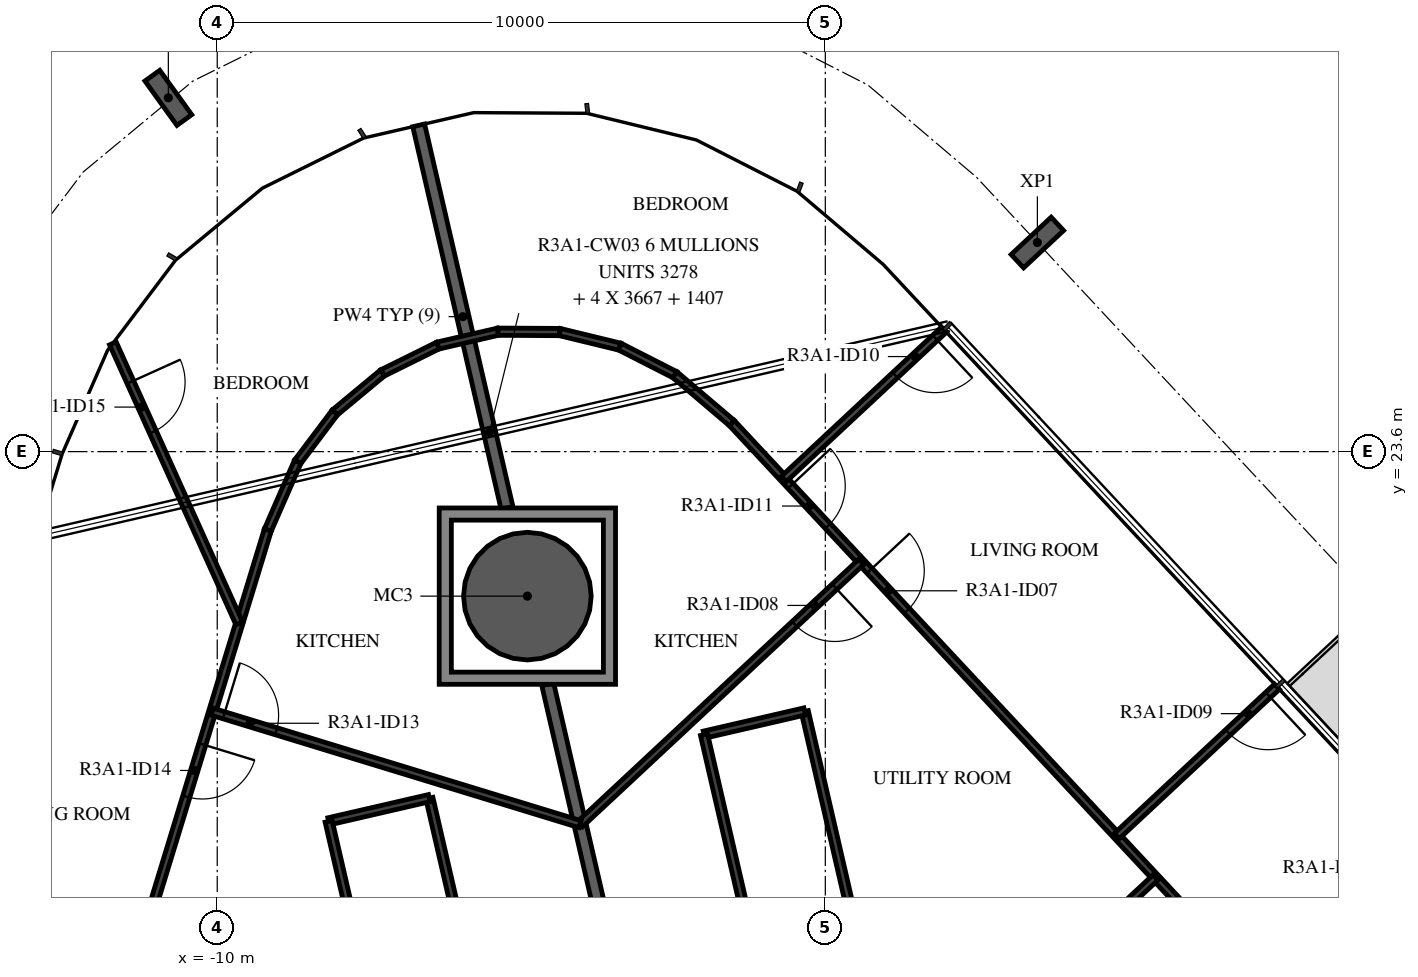
"""IFC4 building model, lengths in metres.
Left out: names, types, materials, properties, quantities, classifications, styles, units other than length and angle.
Written with IfcOpenShell. Run it as: python <this file> out.ifc"""

import sys

from ifc_helpers import new_model, si_unit, direction, frame, frame_2d, origin, origin_2d, place, context, subcontext, project, spatial, polyline, rectangle, hollow_circle, i_section, outline, extrude, element, fill, save


model = new_model("IFC4")
c1 = context("Model", 3, precision=1e-05, world=origin(), true_north=direction((0.0, 1.0)))
c2 = subcontext(c1, "Body", "Model", "MODEL_VIEW")
j1 = project(units=[si_unit("LENGTHUNIT", "METRE"), si_unit("PLANEANGLEUNIT", "RADIAN")], contexts=[c1])
p1 = place(None, origin())
s1 = spatial("IfcSite", under=j1, at=p1, CompositionType="ELEMENT")
p2 = place(p1, origin())
s2 = spatial("IfcBuilding", under=s1, at=p2, CompositionType="ELEMENT")
p3 = place(p2, frame((0.0, 0.0, 116.9)))
s3 = spatial("IfcBuildingStorey", under=s2, at=p3, CompositionType="ELEMENT", Elevation=116.9)
p4 = place(p3, frame((-4.9, 21.223, -0.38), z_axis=(0.0, 0.0, 1.0), x_axis=(1.0, 0.0, 0.0)))
e1 = element("IfcColumn", 1, at=p4, inside=s3, PredefinedType="COLUMN", context=c2, shape_type="SweptSolid", body=[
    extrude(hollow_circle(Radius=1.05, WallThickness=0.05, at=origin_2d()), origin(), (0.0, 0.0, 1.0), 3.5),
])
for number, where, z_axis, x_axis in (
    (2, (3.487, 27.039, -0.38), (0.0, 0.0, 1.0), (0.682, -0.731, 0.0)),
    (3, (-10.804, 29.418, -0.38), (0.0, 0.0, 1.0), (0.811, 0.585, 0.0)),
):
    element("IfcColumn", number, at=place(p3, frame(where, z_axis=z_axis, x_axis=x_axis)), inside=s3, PredefinedType="COLUMN", context=c2, shape_type="SweptSolid", body=[
        extrude(i_section(OverallWidth=0.3, OverallDepth=0.9, WebThickness=0.019, FlangeThickness=0.035, FilletRadius=0.03, at=origin_2d()), origin(), (0.0, 0.0, 1.0), 3.5),
    ])
p5 = place(p3, frame((-4.565, 19.773, 0.0), z_axis=(0.0, 0.0, 1.0), x_axis=(0.224940633072, -0.974372470667, 0.0)))
e4 = element("IfcWall", 4, at=p5, inside=s3, PredefinedType="STANDARD", context=c2, shape_type="SweptSolid", body=[
    extrude(rectangle(XDim=6.594, YDim=0.2, at=frame_2d((3.297, 0.0))), origin(), (0.0, 0.0, 1.0), 3.12),
])
p6 = place(p3, frame((-6.687, 28.966, 0.0), z_axis=(0.0, 0.0, 1.0), x_axis=(0.224945100086, -0.974371439415, 0.0)))
e5 = element("IfcWall", 5, at=p6, inside=s3, PredefinedType="STANDARD", context=c2, shape_type="SweptSolid", body=[
    extrude(rectangle(XDim=6.458, YDim=0.2, at=frame_2d((3.229, 0.0))), origin(), (0.0, 0.0, 1.0), 3.12),
])
p7 = place(p3, frame((0.496, 15.714, 0.0), z_axis=(0.0, 0.0, 1.0), x_axis=(-0.224960478174, 0.974367889075, 0.0)))
e6 = element("IfcWall", 6, at=p7, inside=s3, PredefinedType="PARTITIONING", context=c2, shape_type="SweptSolid", body=[
    extrude(rectangle(XDim=3.708, YDim=0.12, at=frame_2d((1.854, 0.0))), origin(), (0.0, 0.0, 1.0), 3.12),
])
p8 = place(p3, frame((-0.338, 19.328, 0.0), z_axis=(0.0, 0.0, 1.0), x_axis=(-0.974383934081, -0.224890971374, 0.0)))
e7 = element("IfcWall", 7, at=p8, inside=s3, PredefinedType="PARTITIONING", context=c2, shape_type="SweptSolid", body=[
    extrude(rectangle(XDim=1.7, YDim=0.12, at=frame_2d((0.85, 0.0))), origin(), (0.0, 0.0, 1.0), 3.12),
])
p9 = place(p3, frame((-1.995, 18.945, 0.0), z_axis=(0.0, 0.0, 1.0), x_axis=(0.224946048274, -0.974371220514, 0.0)))
e8 = element("IfcWall", 8, at=p9, inside=s3, PredefinedType="PARTITIONING", context=c2, shape_type="SweptSolid", body=[
    extrude(rectangle(XDim=3.708, YDim=0.12, at=frame_2d((1.854, 0.0))), origin(), (0.0, 0.0, 1.0), 3.12),
])
p10 = place(p3, frame((-1.539, 24.071, 0.0), z_axis=(0.0, 0.0, 1.0), x_axis=(0.68200220595, -0.731350115252, 0.0)))
e9 = element("IfcWall", 9, at=p10, inside=s3, PredefinedType="PARTITIONING", context=c2, shape_type="SweptSolid", body=[
    extrude(rectangle(XDim=17.316, YDim=0.12, at=frame_2d((8.658, 0.0))), origin(), (0.0, 0.0, 1.0), 3.12),
])
p11 = place(p10, frame((3.323, 0.0, 0.0)))
e10 = element("IfcOpeningElement", 10, at=p11, cuts=e9, PredefinedType="OPENING", context=c2, shape_type="SweptSolid", body=[
    extrude(rectangle(XDim=0.9, YDim=2.1, at=frame_2d((0.45, 1.05))), frame((0.0, 0.07, 0.0), z_axis=(0.0, -1.0, 0.0), x_axis=(1.0, 0.0, 0.0)), (0.0, 0.0, 1.0), 0.14),
])
p12 = place(p10, frame((1.417, 0.0, 0.0)))
e11 = element("IfcOpeningElement", 11, at=p12, cuts=e9, PredefinedType="OPENING", context=c2, shape_type="SweptSolid", body=[
    extrude(rectangle(XDim=0.9, YDim=2.1, at=frame_2d((0.45, 1.05))), frame((0.0, 0.07, 0.0), z_axis=(0.0, -1.0, 0.0), x_axis=(1.0, 0.0, 0.0)), (0.0, 0.0, 1.0), 0.14),
])
p13 = place(p3, frame((7.427, 19.734, 0.0), z_axis=(0.0, 0.0, 1.0), x_axis=(-0.73139345201, -0.681955730497, 0.0)))
e12 = element("IfcWall", 12, at=p13, inside=s3, PredefinedType="PARTITIONING", context=c2, shape_type="SweptSolid", body=[
    extrude(rectangle(XDim=3.6, YDim=0.12, at=frame_2d((1.8, 0.0))), origin(), (0.0, 0.0, 1.0), 2.73),
])
p14 = place(p13, frame((0.2, 0.0, 0.0)))
e13 = element("IfcOpeningElement", 13, at=p14, cuts=e12, PredefinedType="OPENING", context=c2, shape_type="SweptSolid", body=[
    extrude(rectangle(XDim=0.9, YDim=2.1, at=frame_2d((0.45, 1.05))), frame((0.0, 0.07, 0.0), z_axis=(0.0, -1.0, 0.0), x_axis=(1.0, 0.0, 0.0)), (0.0, 0.0, 1.0), 0.14),
])
p15 = place(p3, frame((5.431, 16.597, 0.0), z_axis=(0.0, 0.0, 1.0), x_axis=(-0.731378807316, -0.681971436505, 0.0)))
e14 = element("IfcWall", 14, at=p15, inside=s3, PredefinedType="PARTITIONING", context=c2, shape_type="SweptSolid", body=[
    extrude(rectangle(XDim=2.609, YDim=0.12, at=frame_2d((1.305, 0.0))), origin(), (0.0, 0.0, 1.0), 3.12),
])
p16 = place(p3, frame((1.951, 25.607, 0.0), z_axis=(0.0, 0.0, 1.0), x_axis=(-0.731328084739, -0.682025829769, 0.0)))
e15 = element("IfcWall", 15, at=p16, inside=s3, PredefinedType="PARTITIONING", context=c2, shape_type="SweptSolid", body=[
    extrude(rectangle(XDim=3.6, YDim=0.12, at=frame_2d((1.8, 0.0))), origin(), (0.0, 0.0, 1.0), 2.73),
])
p17 = place(p16, frame((0.2, 0.0, 0.0)))
e16 = element("IfcOpeningElement", 16, at=p17, cuts=e15, PredefinedType="OPENING", context=c2, shape_type="SweptSolid", body=[
    extrude(rectangle(XDim=0.9, YDim=2.1, at=frame_2d((0.45, 1.05))), frame((0.0, 0.07, 0.0), z_axis=(0.0, -1.0, 0.0), x_axis=(1.0, 0.0, 0.0)), (0.0, 0.0, 1.0), 0.14),
])
p18 = place(p3, frame((0.591, 21.787, 0.0), z_axis=(0.0, 0.0, 1.0), x_axis=(-0.731363296574, -0.681988070588, 0.0)))
e17 = element("IfcWall", 17, at=p18, inside=s3, PredefinedType="PARTITIONING", context=c2, shape_type="SweptSolid", body=[
    extrude(rectangle(XDim=6.324, YDim=0.12, at=frame_2d((3.162, 0.0))), origin(), (0.0, 0.0, 1.0), 3.12),
])
p19 = place(p18, frame((0.6, 0.0, 0.0)))
e18 = element("IfcOpeningElement", 18, at=p19, cuts=e17, PredefinedType="OPENING", context=c2, shape_type="SweptSolid", body=[
    extrude(rectangle(XDim=0.9, YDim=2.1, at=frame_2d((0.45, 1.05))), frame((0.0, 0.07, 0.0), z_axis=(0.0, -1.0, 0.0), x_axis=(1.0, 0.0, 0.0)), (0.0, 0.0, 1.0), 0.14),
])
for number, where, z_axis, x_axis in (
    (19, (-6.372, 25.344, 0.0), (0.0, 0.0, 1.0), (0.974, 0.225, 0.0)),
    (20, (-5.383, 25.572, 0.0), (0.0, 0.0, 1.0), (1.0, -0.006, 0.0)),
):
    element("IfcWall", number, at=place(p3, frame(where, z_axis=z_axis, x_axis=x_axis)), inside=s3, PredefinedType="PARTITIONING", context=c2, shape_type="SweptSolid", body=[
        extrude(rectangle(XDim=1.016, YDim=0.12, at=frame_2d((0.508, 0.0))), origin(), (0.0, 0.0, 1.0), 3.12),
    ])
p20 = place(p3, frame((-4.367, 25.566, 0.0), z_axis=(0.0, 0.0, 1.0), x_axis=(0.971704876381, -0.236198292157, 0.0)))
e21 = element("IfcWall", 21, at=p20, inside=s3, PredefinedType="PARTITIONING", context=c2, shape_type="SweptSolid", body=[
    extrude(rectangle(XDim=1.016, YDim=0.12, at=frame_2d((0.508, 0.0))), origin(), (0.0, 0.0, 1.0), 3.12),
])
p21 = place(p3, frame((-3.379, 25.326, 0.0), z_axis=(0.0, 0.0, 1.0), x_axis=(0.890890892221, -0.454217368842, 0.0)))
e22 = element("IfcWall", 22, at=p21, inside=s3, PredefinedType="PARTITIONING", context=c2, shape_type="SweptSolid", body=[
    extrude(rectangle(XDim=1.016, YDim=0.12, at=frame_2d((0.508, 0.0))), origin(), (0.0, 0.0, 1.0), 3.12),
])
p22 = place(p3, frame((-2.474, 24.865, 0.0), z_axis=(0.0, 0.0, 1.0), x_axis=(0.762351487461, -0.647163201647, 0.0)))
e23 = element("IfcWall", 23, at=p22, inside=s3, PredefinedType="PARTITIONING", context=c2, shape_type="SweptSolid", body=[
    extrude(rectangle(XDim=1.227, YDim=0.12, at=frame_2d((0.614, 0.0))), origin(), (0.0, 0.0, 1.0), 3.12),
])
p23 = place(p3, frame((-5.677, 14.289, 0.0), z_axis=(0.0, 0.0, 1.0), x_axis=(-0.224960478174, 0.974367889075, 0.0)))
e24 = element("IfcWall", 24, at=p23, inside=s3, PredefinedType="PARTITIONING", context=c2, shape_type="SweptSolid", body=[
    extrude(rectangle(XDim=3.708, YDim=0.12, at=frame_2d((1.854, 0.0))), origin(), (0.0, 0.0, 1.0), 3.12),
])
p24 = place(p3, frame((-6.512, 17.902, 0.0), z_axis=(0.0, 0.0, 1.0), x_axis=(-0.974376669418, -0.224922444621, 0.0)))
e25 = element("IfcWall", 25, at=p24, inside=s3, PredefinedType="PARTITIONING", context=c2, shape_type="SweptSolid", body=[
    extrude(rectangle(XDim=1.7, YDim=0.12, at=frame_2d((0.85, 0.0))), origin(), (0.0, 0.0, 1.0), 3.12),
])
p25 = place(p3, frame((-8.168, 17.52, 0.0), z_axis=(0.0, 0.0, 1.0), x_axis=(0.224960478174, -0.974367889075, 0.0)))
e26 = element("IfcWall", 26, at=p25, inside=s3, PredefinedType="PARTITIONING", context=c2, shape_type="SweptSolid", body=[
    extrude(rectangle(XDim=3.708, YDim=0.12, at=frame_2d((1.854, 0.0))), origin(), (0.0, 0.0, 1.0), 3.12),
])
p26 = place(p3, frame((-6.372, 25.344, 0.0), z_axis=(0.0, 0.0, 1.0), x_axis=(-0.896341374877, -0.443364567466, 0.0)))
e27 = element("IfcWall", 27, at=p26, inside=s3, PredefinedType="PARTITIONING", context=c2, shape_type="SweptSolid", body=[
    extrude(rectangle(XDim=1.016, YDim=0.12, at=frame_2d((0.508, 0.0))), origin(), (0.0, 0.0, 1.0), 3.12),
])
p27 = place(p3, frame((-7.283, 24.893, 0.0), z_axis=(0.0, 0.0, 1.0), x_axis=(-0.769657158348, -0.638457405473, 0.0)))
e28 = element("IfcWall", 28, at=p27, inside=s3, PredefinedType="PARTITIONING", context=c2, shape_type="SweptSolid", body=[
    extrude(rectangle(XDim=1.016, YDim=0.12, at=frame_2d((0.508, 0.0))), origin(), (0.0, 0.0, 1.0), 3.12),
])
p28 = place(p3, frame((-8.065, 24.245, 0.0), z_axis=(0.0, 0.0, 1.0), x_axis=(-0.601959070304, -0.798526942363, 0.0)))
e29 = element("IfcWall", 29, at=p28, inside=s3, PredefinedType="PARTITIONING", context=c2, shape_type="SweptSolid", body=[
    extrude(rectangle(XDim=1.016, YDim=0.12, at=frame_2d((0.508, 0.0))), origin(), (0.0, 0.0, 1.0), 3.12),
])
p29 = place(p3, frame((-8.677, 23.433, 0.0), z_axis=(0.0, 0.0, 1.0), x_axis=(-0.401351130635, -0.915924270853, 0.0)))
e30 = element("IfcWall", 30, at=p29, inside=s3, PredefinedType="PARTITIONING", context=c2, shape_type="SweptSolid", body=[
    extrude(rectangle(XDim=1.227, YDim=0.12, at=frame_2d((0.614, 0.0))), origin(), (0.0, 0.0, 1.0), 3.12),
])
p30 = place(p3, frame((-9.169, 22.31, 0.0), z_axis=(0.0, 0.0, 1.0), x_axis=(-0.29236145486, -0.956307889601, 0.0)))
e31 = element("IfcWall", 31, at=p30, inside=s3, PredefinedType="PARTITIONING", context=c2, shape_type="SweptSolid", body=[
    extrude(rectangle(XDim=17.316, YDim=0.12, at=frame_2d((8.658, 0.0))), origin(), (0.0, 0.0, 1.0), 3.12),
])
p31 = place(p30, frame((3.683, 0.0, 0.0)))
e32 = element("IfcOpeningElement", 32, at=p31, cuts=e31, PredefinedType="OPENING", context=c2, shape_type="SweptSolid", body=[
    extrude(rectangle(XDim=0.9, YDim=2.1, at=frame_2d((0.45, 1.05))), frame((0.0, 0.07, 0.0), z_axis=(0.0, -1.0, 0.0), x_axis=(1.0, 0.0, 0.0)), (0.0, 0.0, 1.0), 0.14),
])
p32 = place(p3, frame((-10.082, 19.323, 0.0), z_axis=(0.0, 0.0, 1.0), x_axis=(0.956300011431, -0.292387222936, 0.0)))
e33 = element("IfcWall", 33, at=p32, inside=s3, PredefinedType="PARTITIONING", context=c2, shape_type="SweptSolid", body=[
    extrude(rectangle(XDim=6.324, YDim=0.12, at=frame_2d((3.162, 0.0))), origin(), (0.0, 0.0, 1.0), 3.12),
])
p33 = place(p32, frame((0.2, 0.0, 0.0)))
e34 = element("IfcOpeningElement", 34, at=p33, cuts=e33, PredefinedType="OPENING", context=c2, shape_type="SweptSolid", body=[
    extrude(rectangle(XDim=0.9, YDim=2.1, at=frame_2d((0.45, 1.05))), frame((0.0, 0.07, 0.0), z_axis=(0.0, -1.0, 0.0), x_axis=(1.0, 0.0, 0.0)), (0.0, 0.0, 1.0), 0.14),
])
p34 = place(p3, frame((-11.717, 25.381, 0.0), z_axis=(0.0, 0.0, 1.0), x_axis=(0.411493504767, -0.911412692217, 0.0)))
e35 = element("IfcWall", 35, at=p34, inside=s3, PredefinedType="PARTITIONING", context=c2, shape_type="SweptSolid", body=[
    extrude(rectangle(XDim=5.052, YDim=0.12, at=frame_2d((2.526, 0.0))), origin(), (0.0, 0.0, 1.0), 3.12),
])
p35 = place(p34, frame((0.7, 0.0, 0.0)))
e36 = element("IfcOpeningElement", 36, at=p35, cuts=e35, PredefinedType="OPENING", context=c2, shape_type="SweptSolid", body=[
    extrude(rectangle(XDim=0.9, YDim=2.1, at=frame_2d((0.45, 1.05))), frame((0.0, 0.07, 0.0), z_axis=(0.0, -1.0, 0.0), x_axis=(1.0, 0.0, 0.0)), (0.0, 0.0, 1.0), 0.14),
])
p36 = place(p3, origin())
e37 = element("IfcWall", 37, at=p36, inside=s3, PredefinedType="STANDARD", context=c2, shape_type="SweptSolid", body=[
    extrude(outline(polyline([(-3.45, 22.674), (-3.45, 19.773), (-6.35, 19.773), (-6.35, 22.674), (-3.45, 22.674)]), holes=[polyline([(-6.15, 19.973), (-3.65, 19.973), (-3.65, 22.473), (-6.15, 22.473), (-6.15, 19.973)])]), origin(), (0.0, 0.0, 1.0), 3.12),
])
p37 = place(p11, origin())
e38 = element("IfcDoor", 38, at=p37, inside=s3, OperationType="SINGLE_SWING_RIGHT", PredefinedType="DOOR", context=c2, shape_type="SweptSolid", body=[
    extrude(rectangle(XDim=0.9, YDim=2.1, at=frame_2d((0.45, 1.05))), frame((0.0, 0.025, 0.0), z_axis=(0.0, -1.0, 0.0), x_axis=(1.0, 0.0, 0.0)), (0.0, 0.0, 1.0), 0.05),
])
fill(e10, e38)
p38 = place(p19, origin())
e39 = element("IfcDoor", 39, at=p38, inside=s3, OperationType="SINGLE_SWING_RIGHT", PredefinedType="DOOR", context=c2, shape_type="SweptSolid", body=[
    extrude(rectangle(XDim=0.9, YDim=2.1, at=frame_2d((0.45, 1.05))), frame((0.0, 0.025, 0.0), z_axis=(0.0, -1.0, 0.0), x_axis=(1.0, 0.0, 0.0)), (0.0, 0.0, 1.0), 0.05),
])
fill(e18, e39)
p39 = place(p14, origin())
e40 = element("IfcDoor", 40, at=p39, inside=s3, OperationType="SINGLE_SWING_LEFT", PredefinedType="DOOR", context=c2, shape_type="SweptSolid", body=[
    extrude(rectangle(XDim=0.9, YDim=2.1, at=frame_2d((0.45, 1.05))), frame((0.0, 0.025, 0.0), z_axis=(0.0, -1.0, 0.0), x_axis=(1.0, 0.0, 0.0)), (0.0, 0.0, 1.0), 0.05),
])
fill(e13, e40)
p40 = place(p17, origin())
e41 = element("IfcDoor", 41, at=p40, inside=s3, OperationType="SINGLE_SWING_RIGHT", PredefinedType="DOOR", context=c2, shape_type="SweptSolid", body=[
    extrude(rectangle(XDim=0.9, YDim=2.1, at=frame_2d((0.45, 1.05))), frame((0.0, 0.025, 0.0), z_axis=(0.0, -1.0, 0.0), x_axis=(1.0, 0.0, 0.0)), (0.0, 0.0, 1.0), 0.05),
])
fill(e16, e41)
p41 = place(p12, origin())
e42 = element("IfcDoor", 42, at=p41, inside=s3, OperationType="SINGLE_SWING_LEFT", PredefinedType="DOOR", context=c2, shape_type="SweptSolid", body=[
    extrude(rectangle(XDim=0.9, YDim=2.1, at=frame_2d((0.45, 1.05))), frame((0.0, 0.025, 0.0), z_axis=(0.0, -1.0, 0.0), x_axis=(1.0, 0.0, 0.0)), (0.0, 0.0, 1.0), 0.05),
])
fill(e11, e42)
p42 = place(p33, origin())
e43 = element("IfcDoor", 43, at=p42, inside=s3, OperationType="SINGLE_SWING_LEFT", PredefinedType="DOOR", context=c2, shape_type="SweptSolid", body=[
    extrude(rectangle(XDim=0.9, YDim=2.1, at=frame_2d((0.45, 1.05))), frame((0.0, 0.025, 0.0), z_axis=(0.0, -1.0, 0.0), x_axis=(1.0, 0.0, 0.0)), (0.0, 0.0, 1.0), 0.05),
])
fill(e34, e43)
p43 = place(p31, origin())
e44 = element("IfcDoor", 44, at=p43, inside=s3, OperationType="SINGLE_SWING_LEFT", PredefinedType="DOOR", context=c2, shape_type="SweptSolid", body=[
    extrude(rectangle(XDim=0.9, YDim=2.1, at=frame_2d((0.45, 1.05))), frame((0.0, 0.025, 0.0), z_axis=(0.0, -1.0, 0.0), x_axis=(1.0, 0.0, 0.0)), (0.0, 0.0, 1.0), 0.05),
])
fill(e32, e44)
p44 = place(p35, origin())
e45 = element("IfcDoor", 45, at=p44, inside=s3, OperationType="SINGLE_SWING_LEFT", PredefinedType="DOOR", context=c2, shape_type="SweptSolid", body=[
    extrude(rectangle(XDim=0.9, YDim=2.1, at=frame_2d((0.45, 1.05))), frame((0.0, 0.025, 0.0), z_axis=(0.0, -1.0, 0.0), x_axis=(1.0, 0.0, 0.0)), (0.0, 0.0, 1.0), 0.05),
])
fill(e36, e45)
save(model, sys.argv[1])
